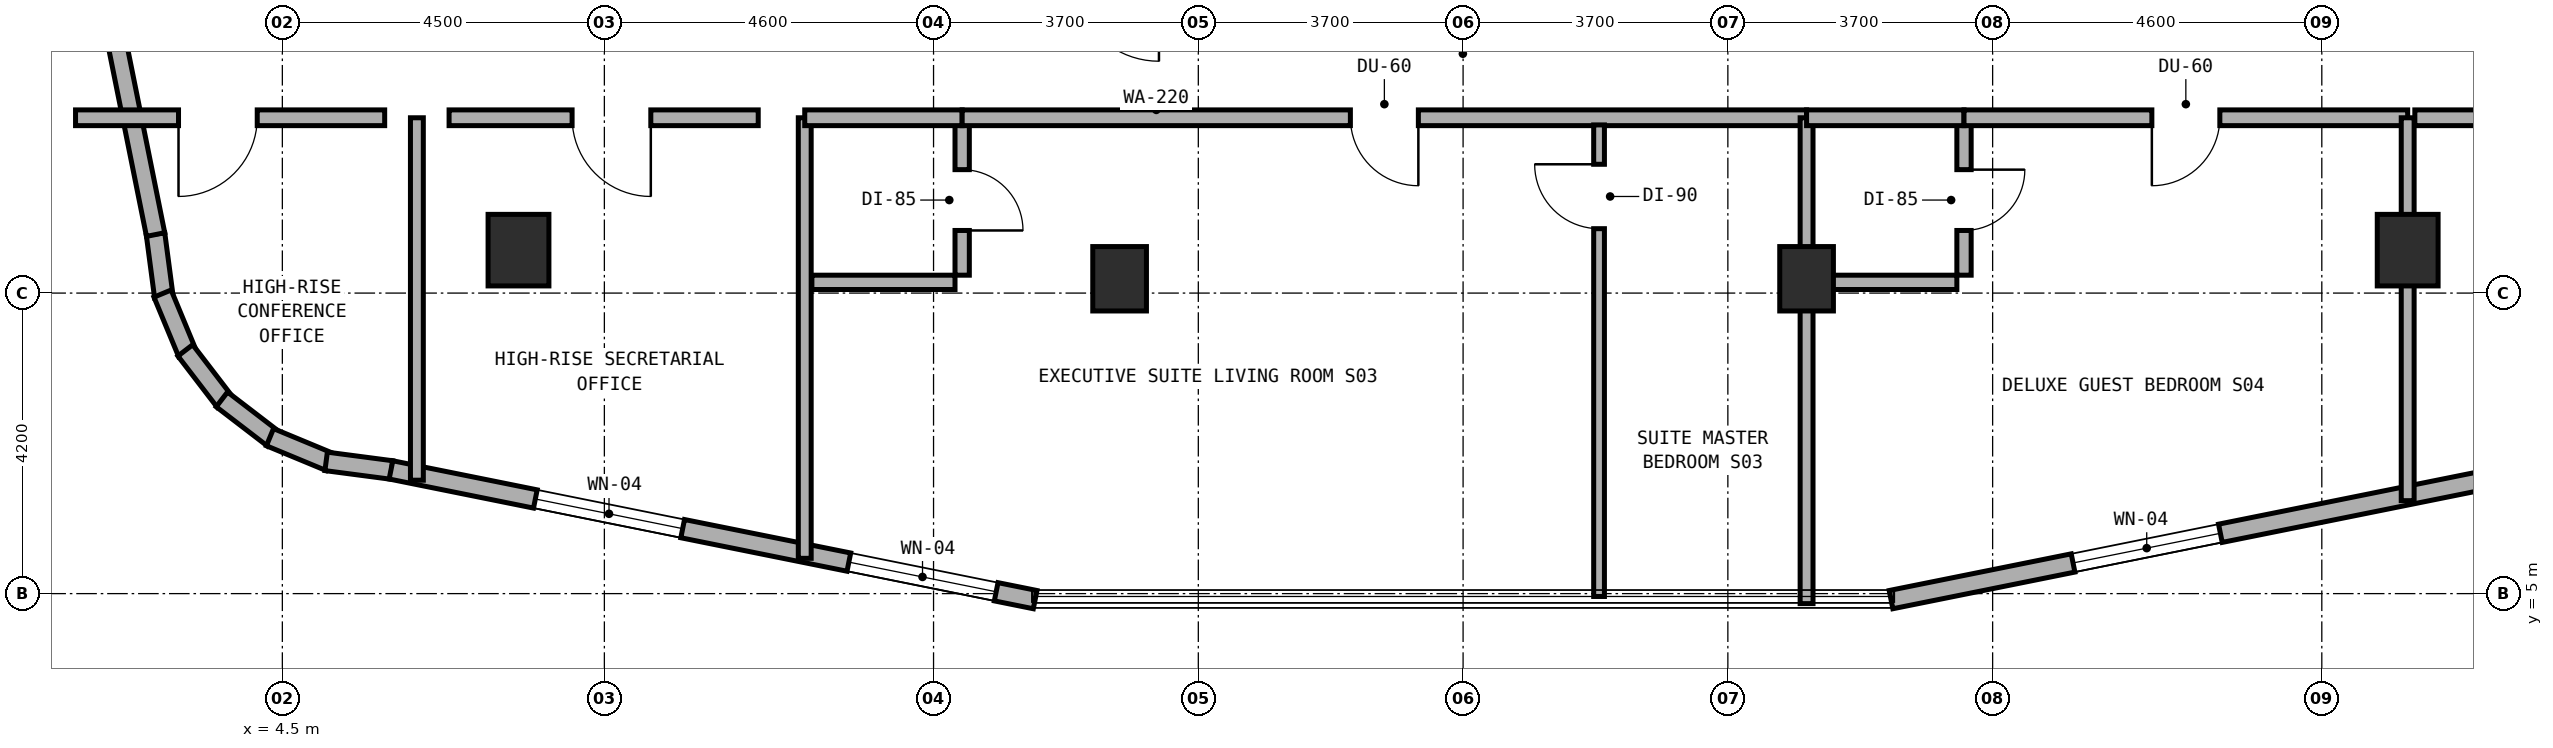
"""IFC4 building model, lengths in metres.
Left out: names, types, materials, properties, quantities, classifications, styles, units other than length and angle.
Written with IfcOpenShell. Run it as: python <this file> out.ifc"""

import sys

from ifc_helpers import new_model, si_unit, direction, frame, frame_2d, origin, origin_2d, place, context, subcontext, project, spatial, rectangle, extrude, element, fill, save


model = new_model("IFC4")
c1 = context("Model", 3, precision=1e-05, world=origin(), true_north=direction((0.0, 1.0)))
c2 = subcontext(c1, "Body", "Model", "MODEL_VIEW")
j1 = project(units=[si_unit("LENGTHUNIT", "METRE"), si_unit("PLANEANGLEUNIT", "RADIAN")], contexts=[c1])
p1 = place(None, origin())
s1 = spatial("IfcSite", under=j1, at=p1, CompositionType="ELEMENT")
p2 = place(p1, origin())
s2 = spatial("IfcBuilding", under=s1, at=p2, CompositionType="ELEMENT")
p3 = place(p2, frame((0.0, 0.0, 169.5)))
s3 = spatial("IfcBuildingStorey", under=s2, at=p3, CompositionType="ELEMENT", Elevation=169.5)
for number, where, z_axis, x_axis in (
    (1, (16.2, 9.4, 0.0), (0.0, 0.0, 1.0), (1.0, 0.0, 0.0)),
    (2, (25.8, 9.4, 0.0), (0.0, 0.0, 1.0), (1.0, 0.0, 0.0)),
):
    element("IfcColumn", number, at=place(p3, frame(where, z_axis=z_axis, x_axis=x_axis)), inside=s3, PredefinedType="COLUMN", context=c2, shape_type="SweptSolid", body=[
        extrude(rectangle(XDim=0.75, YDim=0.9, at=origin_2d()), origin(), (0.0, 0.0, 1.0), 3.5),
    ])
for number, where, z_axis, x_axis in (
    (3, (7.8, 9.8, 0.0), (0.0, 0.0, 1.0), (1.0, 0.0, 0.0)),
    (4, (34.2, 9.8, 0.0), (0.0, 0.0, 1.0), (1.0, 0.0, 0.0)),
):
    element("IfcColumn", number, at=place(p3, frame(where, z_axis=z_axis, x_axis=x_axis)), inside=s3, PredefinedType="COLUMN", context=c2, shape_type="SweptSolid", body=[
        extrude(rectangle(XDim=0.85, YDim=1.0, at=origin_2d()), origin(), (0.0, 0.0, 1.0), 3.5),
    ])
p4 = place(p3, frame((2.728, 10.025, 0.0), z_axis=(0.0, 0.0, 1.0), x_axis=(0.130953706898, -0.991388484223, 0.0)))
e5 = element("IfcWall", 5, at=p4, inside=s3, PredefinedType="STANDARD", context=c2, shape_type="SweptSolid", body=[
    extrude(rectangle(XDim=0.885, YDim=0.26, at=frame_2d((0.443, 0.0))), origin(), (0.0, 0.0, 1.0), 3.18),
])
p5 = place(p3, frame((2.826, 9.193, 0.0), z_axis=(0.0, 0.0, 1.0), x_axis=(0.383290660547, -0.923627776508, 0.0)))
e6 = element("IfcWall", 6, at=p5, inside=s3, PredefinedType="STANDARD", context=c2, shape_type="SweptSolid", body=[
    extrude(rectangle(XDim=0.903, YDim=0.26, at=frame_2d((0.452, 0.0))), origin(), (0.0, 0.0, 1.0), 3.18),
])
p6 = place(p3, frame((3.144, 8.399, 0.0), z_axis=(0.0, 0.0, 1.0), x_axis=(0.608624690463, -0.793458244748, 0.0)))
e7 = element("IfcWall", 7, at=p6, inside=s3, PredefinedType="STANDARD", context=c2, shape_type="SweptSolid", body=[
    extrude(rectangle(XDim=0.902, YDim=0.26, at=frame_2d((0.451, 0.0))), origin(), (0.0, 0.0, 1.0), 3.18),
])
p7 = place(p3, frame((3.655, 7.714, 0.0), z_axis=(0.0, 0.0, 1.0), x_axis=(0.793558456666, -0.608494022858, 0.0)))
e8 = element("IfcWall", 8, at=p7, inside=s3, PredefinedType="STANDARD", context=c2, shape_type="SweptSolid", body=[
    extrude(rectangle(XDim=0.902, YDim=0.26, at=frame_2d((0.451, 0.0))), origin(), (0.0, 0.0, 1.0), 3.18),
])
p8 = place(p3, frame((4.327, 7.186, 0.0), z_axis=(0.0, 0.0, 1.0), x_axis=(0.923683767999, -0.383155708213, 0.0)))
e9 = element("IfcWall", 9, at=p8, inside=s3, PredefinedType="STANDARD", context=c2, shape_type="SweptSolid", body=[
    extrude(rectangle(XDim=0.903, YDim=0.26, at=frame_2d((0.451, 0.0))), origin(), (0.0, 0.0, 1.0), 3.18),
])
p9 = place(p3, frame((5.112, 6.848, 0.0), z_axis=(0.0, 0.0, 1.0), x_axis=(0.991487658083, -0.130200706103, 0.0)))
e10 = element("IfcWall", 10, at=p9, inside=s3, PredefinedType="STANDARD", context=c2, shape_type="SweptSolid", body=[
    extrude(rectangle(XDim=0.921, YDim=0.26, at=frame_2d((0.46, 0.0))), origin(), (0.0, 0.0, 1.0), 3.18),
])
p10 = place(p3, frame((6.018, 6.729, 0.0), z_axis=(0.0, 0.0, 1.0), x_axis=(0.980315963543, -0.197435082048, 0.0)))
e11 = element("IfcWall", 11, at=p10, inside=s3, PredefinedType="STANDARD", context=c2, shape_type="SweptSolid", body=[
    extrude(rectangle(XDim=9.183, YDim=0.26, at=frame_2d((4.591, 0.0))), origin(), (0.0, 0.0, 1.0), 3.18),
])
p11 = place(p10, frame((2.058, 0.0, 0.85)))
e12 = element("IfcOpeningElement", 12, at=p11, cuts=e11, PredefinedType="OPENING", context=c2, shape_type="SweptSolid", body=[
    extrude(rectangle(XDim=2.1, YDim=1.5, at=frame_2d((1.05, 0.75))), frame((0.0, 0.14, 0.0), z_axis=(0.0, -1.0, 0.0), x_axis=(1.0, 0.0, 0.0)), (0.0, 0.0, 1.0), 0.28),
])
p12 = place(p10, frame((6.527, 0.0, 0.85)))
e13 = element("IfcOpeningElement", 13, at=p12, cuts=e11, PredefinedType="OPENING", context=c2, shape_type="SweptSolid", body=[
    extrude(rectangle(XDim=2.1, YDim=1.5, at=frame_2d((1.05, 0.75))), frame((0.0, 0.14, 0.0), z_axis=(0.0, -1.0, 0.0), x_axis=(1.0, 0.0, 0.0)), (0.0, 0.0, 1.0), 0.28),
])
p13 = place(p3, frame((26.98, 4.916, 0.0), z_axis=(0.0, 0.0, 1.0), x_axis=(0.980315963543, 0.197435082048, 0.0)))
e14 = element("IfcWall", 14, at=p13, inside=s3, PredefinedType="STANDARD", context=c2, shape_type="SweptSolid", body=[
    extrude(rectangle(XDim=9.183, YDim=0.26, at=frame_2d((4.591, 0.0))), origin(), (0.0, 0.0, 1.0), 3.18),
])
p14 = place(p13, frame((2.595, 0.0, 0.85)))
e15 = element("IfcOpeningElement", 15, at=p14, cuts=e14, PredefinedType="OPENING", context=c2, shape_type="SweptSolid", body=[
    extrude(rectangle(XDim=2.1, YDim=1.5, at=frame_2d((1.05, 0.75))), frame((0.0, 0.14, 0.0), z_axis=(0.0, -1.0, 0.0), x_axis=(1.0, 0.0, 0.0)), (0.0, 0.0, 1.0), 0.28),
])
p15 = place(p3, frame((0.916, 19.02, 0.0), z_axis=(0.0, 0.0, 1.0), x_axis=(0.197435082048, -0.980315963543, 0.0)))
e16 = element("IfcWall", 16, at=p15, inside=s3, PredefinedType="STANDARD", context=c2, shape_type="SweptSolid", body=[
    extrude(rectangle(XDim=9.183, YDim=0.26, at=frame_2d((4.591, 0.0))), origin(), (0.0, 0.0, 1.0), 3.18),
])
p16 = place(p15, frame((2.647, 0.0, 0.85)))
e17 = element("IfcOpeningElement", 17, at=p16, cuts=e16, PredefinedType="OPENING", context=c2, shape_type="SweptSolid", body=[
    extrude(rectangle(XDim=2.1, YDim=1.5, at=frame_2d((1.05, 0.75))), frame((0.0, 0.14, 0.0), z_axis=(0.0, -1.0, 0.0), x_axis=(1.0, 0.0, 0.0)), (0.0, 0.0, 1.0), 0.28),
])
p17 = place(p3, frame((6.38, 6.585, 0.0), z_axis=(0.0, 0.0, 1.0), x_axis=(0.0, 1.0, 0.0)))
e18 = element("IfcWall", 18, at=p17, inside=s3, PredefinedType="SOLIDWALL", context=c2, shape_type="SweptSolid", body=[
    extrude(rectangle(XDim=5.065, YDim=0.18, at=frame_2d((2.532, 0.0))), origin(), (0.0, 0.0, 1.0), 3.18),
])
p18 = place(p3, frame((1.61, 11.65, 0.0), z_axis=(0.0, 0.0, 1.0), x_axis=(1.0, 0.0, 0.0)))
e19 = element("IfcWall", 19, at=p18, inside=s3, PredefinedType="SOLIDWALL", context=c2, shape_type="SweptSolid", body=[
    extrude(rectangle(XDim=4.32, YDim=0.22, at=frame_2d((2.16, 0.0))), origin(), (0.0, 0.0, 1.0), 3.18),
])
p19 = place(p18, frame((1.439, 0.0, 0.0)))
e20 = element("IfcOpeningElement", 20, at=p19, cuts=e19, PredefinedType="OPENING", context=c2, shape_type="SweptSolid", body=[
    extrude(rectangle(XDim=1.1, YDim=2.1, at=frame_2d((0.55, 1.05))), frame((0.0, 0.12, 0.0), z_axis=(0.0, -1.0, 0.0), x_axis=(1.0, 0.0, 0.0)), (0.0, 0.0, 1.0), 0.24),
])
p20 = place(p3, frame((6.83, 11.65, 0.0), z_axis=(0.0, 0.0, 1.0), x_axis=(1.0, 0.0, 0.0)))
e21 = element("IfcWall", 21, at=p20, inside=s3, PredefinedType="SOLIDWALL", context=c2, shape_type="SweptSolid", body=[
    extrude(rectangle(XDim=4.32, YDim=0.22, at=frame_2d((2.16, 0.0))), origin(), (0.0, 0.0, 1.0), 2.855),
])
p21 = place(p20, frame((1.719, 0.0, 0.0)))
e22 = element("IfcOpeningElement", 22, at=p21, cuts=e21, PredefinedType="OPENING", context=c2, shape_type="SweptSolid", body=[
    extrude(rectangle(XDim=1.1, YDim=2.1, at=frame_2d((0.55, 1.05))), frame((0.0, 0.12, 0.0), z_axis=(0.0, -1.0, 0.0), x_axis=(1.0, 0.0, 0.0)), (0.0, 0.0, 1.0), 0.24),
])
p22 = place(p3, frame((11.8, 5.493, 0.0), z_axis=(0.0, 0.0, 1.0), x_axis=(0.0, 1.0, 0.0)))
e23 = element("IfcWall", 23, at=p22, inside=s3, PredefinedType="SOLIDWALL", context=c2, shape_type="SweptSolid", body=[
    extrude(rectangle(XDim=6.157, YDim=0.18, at=frame_2d((3.079, 0.0))), origin(), (0.0, 0.0, 1.0), 2.795),
])
p23 = place(p3, frame((14.0, 9.45, 0.0), z_axis=(0.0, 0.0, 1.0), x_axis=(0.0, 1.0, 0.0)))
e24 = element("IfcWall", 24, at=p23, inside=s3, PredefinedType="PLUMBINGWALL", context=c2, shape_type="SweptSolid", body=[
    extrude(rectangle(XDim=2.1, YDim=0.2, at=frame_2d((1.05, 0.0))), origin(), (0.0, 0.0, 1.0), 2.795),
])
p24 = place(p23, frame((0.625, 0.0, 0.0)))
e25 = element("IfcOpeningElement", 25, at=p24, cuts=e24, PredefinedType="OPENING", context=c2, shape_type="SweptSolid", body=[
    extrude(rectangle(XDim=0.85, YDim=2.1, at=frame_2d((0.425, 1.05))), frame((0.0, 0.11, 0.0), z_axis=(0.0, -1.0, 0.0), x_axis=(1.0, 0.0, 0.0)), (0.0, 0.0, 1.0), 0.22),
])
p25 = place(p3, frame((11.9, 9.35, 0.0), z_axis=(0.0, 0.0, 1.0), x_axis=(1.0, 0.0, 0.0)))
e26 = element("IfcWall", 26, at=p25, inside=s3, PredefinedType="PLUMBINGWALL", context=c2, shape_type="SweptSolid", body=[
    extrude(rectangle(XDim=2.0, YDim=0.2, at=frame_2d((1.0, 0.0))), origin(), (0.0, 0.0, 1.0), 2.795),
])
p26 = place(p3, frame((11.8, 11.65, 0.0), z_axis=(0.0, 0.0, 1.0), x_axis=(1.0, 0.0, 0.0)))
e27 = element("IfcWall", 27, at=p26, inside=s3, PredefinedType="SOLIDWALL", context=c2, shape_type="SweptSolid", body=[
    extrude(rectangle(XDim=2.2, YDim=0.22, at=frame_2d((1.1, 0.0))), origin(), (0.0, 0.0, 1.0), 3.18),
])
p27 = place(p3, frame((14.0, 11.65, 0.0), z_axis=(0.0, 0.0, 1.0), x_axis=(1.0, 0.0, 0.0)))
e28 = element("IfcWall", 28, at=p27, inside=s3, PredefinedType="SOLIDWALL", context=c2, shape_type="SweptSolid", body=[
    extrude(rectangle(XDim=11.8, YDim=0.22, at=frame_2d((5.9, 0.0))), origin(), (0.0, 0.0, 1.0), 2.855),
])
p28 = place(p27, frame((5.425, 0.0, 0.0)))
e29 = element("IfcOpeningElement", 29, at=p28, cuts=e28, PredefinedType="OPENING", context=c2, shape_type="SweptSolid", body=[
    extrude(rectangle(XDim=0.95, YDim=2.1, at=frame_2d((0.475, 1.05))), frame((0.0, 0.12, 0.0), z_axis=(0.0, -1.0, 0.0), x_axis=(1.0, 0.0, 0.0)), (0.0, 0.0, 1.0), 0.24),
])
p29 = place(p3, frame((22.9, 4.96, 0.0), z_axis=(0.0, 0.0, 1.0), x_axis=(0.0, 1.0, 0.0)))
e30 = element("IfcWall", 30, at=p29, inside=s3, PredefinedType="PARTITIONING", context=c2, shape_type="SweptSolid", body=[
    extrude(rectangle(XDim=6.59, YDim=0.15, at=frame_2d((3.295, 0.0))), origin(), (0.0, 0.0, 1.0), 2.795),
])
p30 = place(p29, frame((5.14, 0.0, 0.0)))
e31 = element("IfcOpeningElement", 31, at=p30, cuts=e30, PredefinedType="OPENING", context=c2, shape_type="SweptSolid", body=[
    extrude(rectangle(XDim=0.9, YDim=2.1, at=frame_2d((0.45, 1.05))), frame((0.0, 0.085, 0.0), z_axis=(0.0, -1.0, 0.0), x_axis=(1.0, 0.0, 0.0)), (0.0, 0.0, 1.0), 0.17),
])
p31 = place(p3, frame((25.8, 4.86, 0.0), z_axis=(0.0, 0.0, 1.0), x_axis=(0.0, 1.0, 0.0)))
e32 = element("IfcWall", 32, at=p31, inside=s3, PredefinedType="SOLIDWALL", context=c2, shape_type="SweptSolid", body=[
    extrude(rectangle(XDim=6.79, YDim=0.18, at=frame_2d((3.395, 0.0))), origin(), (0.0, 0.0, 1.0), 2.795),
])
p32 = place(p3, frame((28.0, 9.45, 0.0), z_axis=(0.0, 0.0, 1.0), x_axis=(0.0, 1.0, 0.0)))
e33 = element("IfcWall", 33, at=p32, inside=s3, PredefinedType="PLUMBINGWALL", context=c2, shape_type="SweptSolid", body=[
    extrude(rectangle(XDim=2.1, YDim=0.2, at=frame_2d((1.05, 0.0))), origin(), (0.0, 0.0, 1.0), 2.795),
])
p33 = place(p32, frame((0.625, 0.0, 0.0)))
e34 = element("IfcOpeningElement", 34, at=p33, cuts=e33, PredefinedType="OPENING", context=c2, shape_type="SweptSolid", body=[
    extrude(rectangle(XDim=0.85, YDim=2.1, at=frame_2d((0.425, 1.05))), frame((0.0, 0.11, 0.0), z_axis=(0.0, -1.0, 0.0), x_axis=(1.0, 0.0, 0.0)), (0.0, 0.0, 1.0), 0.22),
])
p34 = place(p3, frame((25.9, 9.35, 0.0), z_axis=(0.0, 0.0, 1.0), x_axis=(1.0, 0.0, 0.0)))
e35 = element("IfcWall", 35, at=p34, inside=s3, PredefinedType="PLUMBINGWALL", context=c2, shape_type="SweptSolid", body=[
    extrude(rectangle(XDim=2.0, YDim=0.2, at=frame_2d((1.0, 0.0))), origin(), (0.0, 0.0, 1.0), 2.795),
])
p35 = place(p3, frame((25.8, 11.65, 0.0), z_axis=(0.0, 0.0, 1.0), x_axis=(1.0, 0.0, 0.0)))
e36 = element("IfcWall", 36, at=p35, inside=s3, PredefinedType="SOLIDWALL", context=c2, shape_type="SweptSolid", body=[
    extrude(rectangle(XDim=2.2, YDim=0.22, at=frame_2d((1.1, 0.0))), origin(), (0.0, 0.0, 1.0), 2.855),
])
p36 = place(p3, frame((28.0, 11.65, 0.0), z_axis=(0.0, 0.0, 1.0), x_axis=(1.0, 0.0, 0.0)))
e37 = element("IfcWall", 37, at=p36, inside=s3, PredefinedType="SOLIDWALL", context=c2, shape_type="SweptSolid", body=[
    extrude(rectangle(XDim=6.2, YDim=0.22, at=frame_2d((3.1, 0.0))), origin(), (0.0, 0.0, 1.0), 2.855),
])
p37 = place(p36, frame((2.625, 0.0, 0.0)))
e38 = element("IfcOpeningElement", 38, at=p37, cuts=e37, PredefinedType="OPENING", context=c2, shape_type="SweptSolid", body=[
    extrude(rectangle(XDim=0.95, YDim=2.1, at=frame_2d((0.475, 1.05))), frame((0.0, 0.12, 0.0), z_axis=(0.0, -1.0, 0.0), x_axis=(1.0, 0.0, 0.0)), (0.0, 0.0, 1.0), 0.24),
])
p38 = place(p3, frame((34.2, 6.299, 0.0), z_axis=(0.0, 0.0, 1.0), x_axis=(0.0, 1.0, 0.0)))
e39 = element("IfcWall", 39, at=p38, inside=s3, PredefinedType="SOLIDWALL", context=c2, shape_type="SweptSolid", body=[
    extrude(rectangle(XDim=5.351, YDim=0.18, at=frame_2d((2.675, 0.0))), origin(), (0.0, 0.0, 1.0), 2.795),
])
p39 = place(p3, frame((34.3, 11.65, 0.0), z_axis=(0.0, 0.0, 1.0), x_axis=(1.0, 0.0, 0.0)))
e40 = element("IfcWall", 40, at=p39, inside=s3, PredefinedType="SOLIDWALL", context=c2, shape_type="SweptSolid", body=[
    extrude(rectangle(XDim=6.64, YDim=0.22, at=frame_2d((3.32, 0.0))), origin(), (0.0, 0.0, 1.0), 2.795),
])
p40 = place(p39, frame((2.55, 0.0, 0.0)))
e41 = element("IfcOpeningElement", 41, at=p40, cuts=e40, PredefinedType="OPENING", context=c2, shape_type="SweptSolid", body=[
    extrude(rectangle(XDim=0.95, YDim=2.1, at=frame_2d((0.475, 1.05))), frame((0.0, 0.12, 0.0), z_axis=(0.0, -1.0, 0.0), x_axis=(1.0, 0.0, 0.0)), (0.0, 0.0, 1.0), 0.24),
])
p41 = place(p11, origin())
e42 = element("IfcWindow", 42, at=p41, inside=s3, PartitioningType="SINGLE_PANEL", PredefinedType="WINDOW", context=c2, shape_type="SweptSolid", body=[
    extrude(rectangle(XDim=2.1, YDim=1.5, at=frame_2d((1.05, 0.75))), frame((0.0, 0.03, 0.0), z_axis=(0.0, -1.0, 0.0), x_axis=(1.0, 0.0, 0.0)), (0.0, 0.0, 1.0), 0.06),
])
fill(e12, e42)
p42 = place(p12, origin())
e43 = element("IfcWindow", 43, at=p42, inside=s3, PartitioningType="SINGLE_PANEL", PredefinedType="WINDOW", context=c2, shape_type="SweptSolid", body=[
    extrude(rectangle(XDim=2.1, YDim=1.5, at=frame_2d((1.05, 0.75))), frame((0.0, 0.03, 0.0), z_axis=(0.0, -1.0, 0.0), x_axis=(1.0, 0.0, 0.0)), (0.0, 0.0, 1.0), 0.06),
])
fill(e13, e43)
p43 = place(p14, origin())
e44 = element("IfcWindow", 44, at=p43, inside=s3, PartitioningType="SINGLE_PANEL", PredefinedType="WINDOW", context=c2, shape_type="SweptSolid", body=[
    extrude(rectangle(XDim=2.1, YDim=1.5, at=frame_2d((1.05, 0.75))), frame((0.0, 0.03, 0.0), z_axis=(0.0, -1.0, 0.0), x_axis=(1.0, 0.0, 0.0)), (0.0, 0.0, 1.0), 0.06),
])
fill(e15, e44)
p44 = place(p19, frame((1.1, 0.0, 0.0), z_axis=(0.0, 0.0, 1.0), x_axis=(-1.0, 0.0, 0.0)))
e45 = element("IfcDoor", 45, at=p44, inside=s3, OperationType="SINGLE_SWING_RIGHT", PredefinedType="DOOR", context=c2, shape_type="SweptSolid", body=[
    extrude(rectangle(XDim=1.1, YDim=2.1, at=frame_2d((0.55, 1.05))), frame((0.0, 0.025, 0.0), z_axis=(0.0, -1.0, 0.0), x_axis=(1.0, 0.0, 0.0)), (0.0, 0.0, 1.0), 0.05),
])
fill(e20, e45)
p45 = place(p21, frame((1.1, 0.0, 0.0), z_axis=(0.0, 0.0, 1.0), x_axis=(-1.0, 0.0, 0.0)))
e46 = element("IfcDoor", 46, at=p45, inside=s3, OperationType="SINGLE_SWING_LEFT", PredefinedType="DOOR", context=c2, shape_type="SweptSolid", body=[
    extrude(rectangle(XDim=1.1, YDim=2.1, at=frame_2d((0.55, 1.05))), frame((0.0, 0.025, 0.0), z_axis=(0.0, -1.0, 0.0), x_axis=(1.0, 0.0, 0.0)), (0.0, 0.0, 1.0), 0.05),
])
fill(e22, e46)
p46 = place(p24, frame((0.85, 0.0, 0.0), z_axis=(0.0, 0.0, 1.0), x_axis=(-1.0, 0.0, 0.0)))
e47 = element("IfcDoor", 47, at=p46, inside=s3, OperationType="SINGLE_SWING_RIGHT", PredefinedType="DOOR", context=c2, shape_type="SweptSolid", body=[
    extrude(rectangle(XDim=0.85, YDim=2.1, at=frame_2d((0.425, 1.05))), frame((0.0, 0.025, 0.0), z_axis=(0.0, -1.0, 0.0), x_axis=(1.0, 0.0, 0.0)), (0.0, 0.0, 1.0), 0.05),
])
fill(e25, e47)
p47 = place(p28, frame((0.95, 0.0, 0.0), z_axis=(0.0, 0.0, 1.0), x_axis=(-1.0, 0.0, 0.0)))
e48 = element("IfcDoor", 48, at=p47, inside=s3, OperationType="SINGLE_SWING_LEFT", PredefinedType="DOOR", context=c2, shape_type="SweptSolid", body=[
    extrude(rectangle(XDim=0.95, YDim=2.1, at=frame_2d((0.475, 1.05))), frame((0.0, 0.025, 0.0), z_axis=(0.0, -1.0, 0.0), x_axis=(1.0, 0.0, 0.0)), (0.0, 0.0, 1.0), 0.05),
])
fill(e29, e48)
p48 = place(p30, origin())
e49 = element("IfcDoor", 49, at=p48, inside=s3, OperationType="SINGLE_SWING_RIGHT", PredefinedType="DOOR", context=c2, shape_type="SweptSolid", body=[
    extrude(rectangle(XDim=0.9, YDim=2.1, at=frame_2d((0.45, 1.05))), frame((0.0, 0.025, 0.0), z_axis=(0.0, -1.0, 0.0), x_axis=(1.0, 0.0, 0.0)), (0.0, 0.0, 1.0), 0.05),
])
fill(e31, e49)
p49 = place(p33, frame((0.85, 0.0, 0.0), z_axis=(0.0, 0.0, 1.0), x_axis=(-1.0, 0.0, 0.0)))
e50 = element("IfcDoor", 50, at=p49, inside=s3, OperationType="SINGLE_SWING_LEFT", PredefinedType="DOOR", context=c2, shape_type="SweptSolid", body=[
    extrude(rectangle(XDim=0.85, YDim=2.1, at=frame_2d((0.425, 1.05))), frame((0.0, 0.025, 0.0), z_axis=(0.0, -1.0, 0.0), x_axis=(1.0, 0.0, 0.0)), (0.0, 0.0, 1.0), 0.05),
])
fill(e34, e50)
p50 = place(p37, frame((0.95, 0.0, 0.0), z_axis=(0.0, 0.0, 1.0), x_axis=(-1.0, 0.0, 0.0)))
e51 = element("IfcDoor", 51, at=p50, inside=s3, OperationType="SINGLE_SWING_RIGHT", PredefinedType="DOOR", context=c2, shape_type="SweptSolid", body=[
    extrude(rectangle(XDim=0.95, YDim=2.1, at=frame_2d((0.475, 1.05))), frame((0.0, 0.025, 0.0), z_axis=(0.0, -1.0, 0.0), x_axis=(1.0, 0.0, 0.0)), (0.0, 0.0, 1.0), 0.05),
])
fill(e38, e51)
save(model, sys.argv[1])
